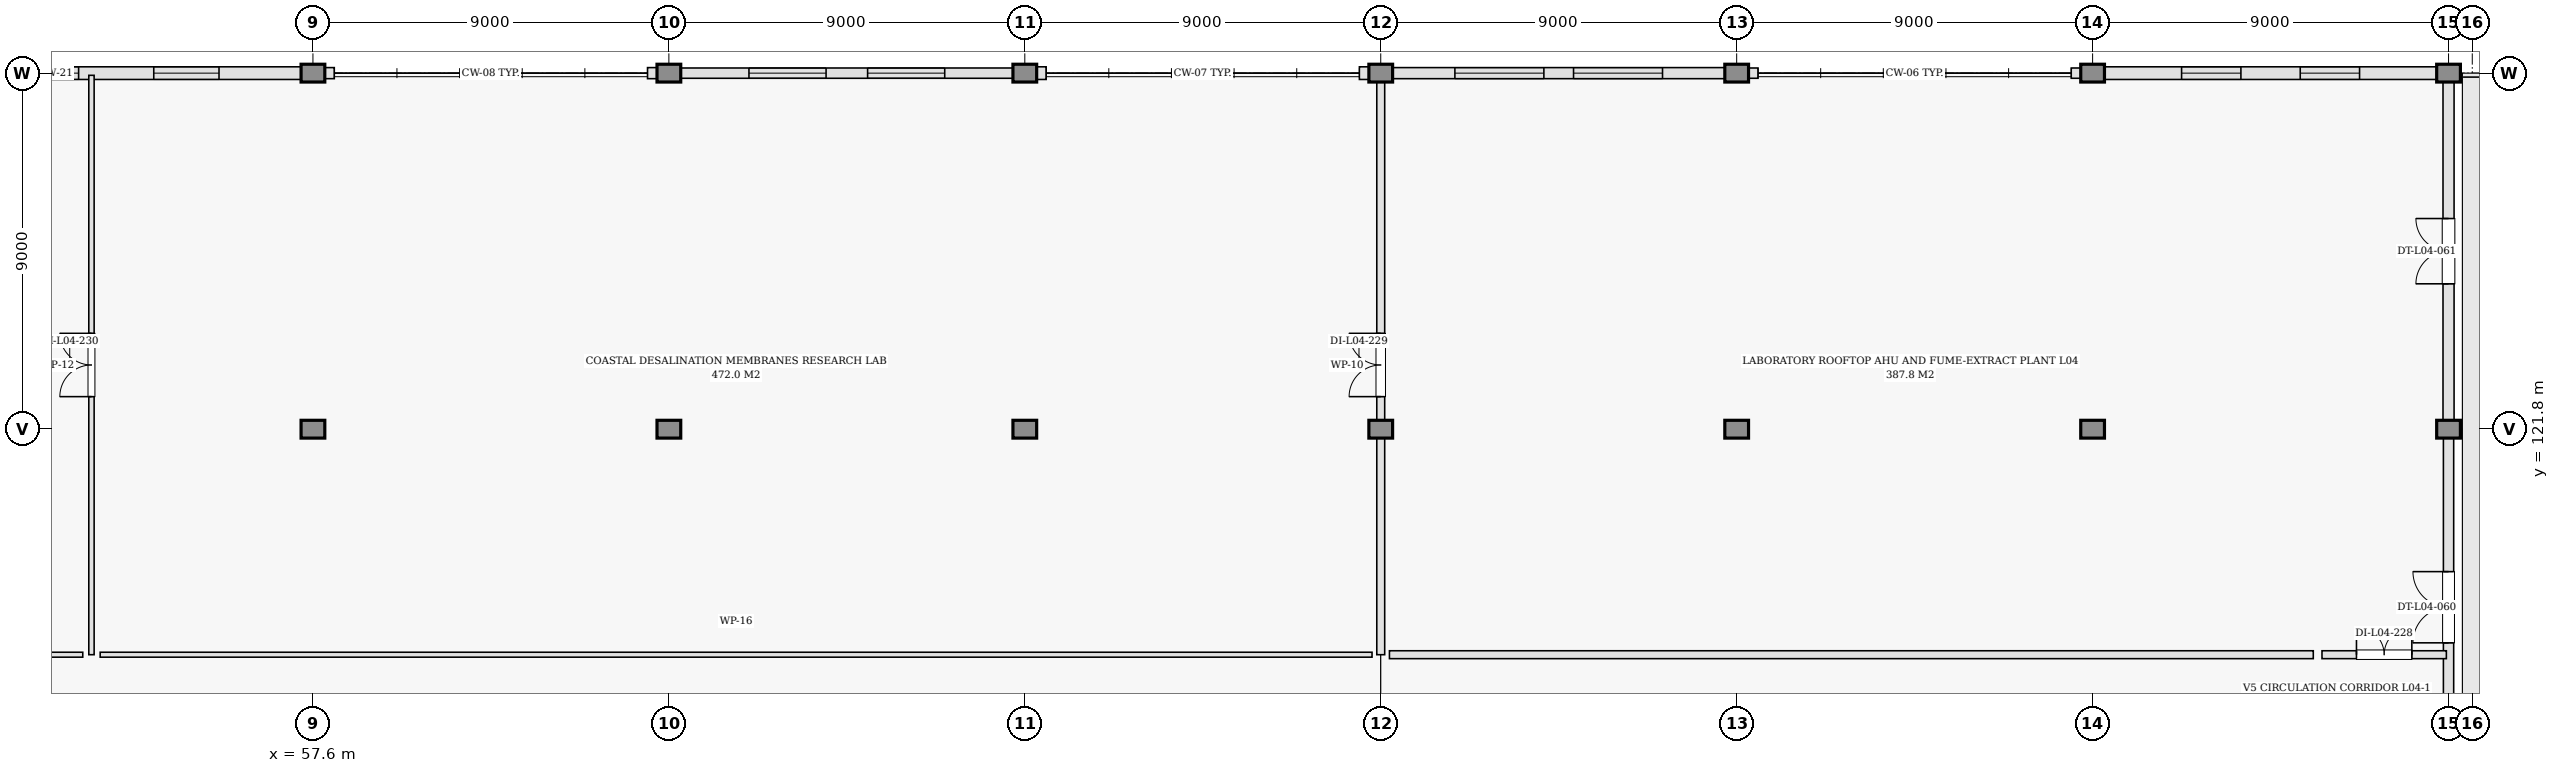
"""IFC4 building model, lengths in metres.
Left out: names, types, materials, properties, quantities, classifications, styles, units other than length and angle.
Written with IfcOpenShell. Run it as: python <this file> out.ifc"""

import sys

from ifc_helpers import new_model, si_unit, direction, frame, frame_2d, origin, origin_2d, place, context, subcontext, project, spatial, rectangle, extrude, element, fill, save


model = new_model("IFC4")
c1 = context("Model", 3, precision=1e-05, world=origin(), true_north=direction((0.0, 1.0)))
c2 = subcontext(c1, "Body", "Model", "MODEL_VIEW")
j1 = project(units=[si_unit("LENGTHUNIT", "METRE"), si_unit("PLANEANGLEUNIT", "RADIAN")], contexts=[c1])
p1 = place(None, origin())
s1 = spatial("IfcSite", under=j1, at=p1, CompositionType="ELEMENT")
p2 = place(p1, origin())
s2 = spatial("IfcBuilding", under=s1, at=p2, CompositionType="ELEMENT")
p3 = place(p2, frame((0.0, 0.0, 18.0)))
s3 = spatial("IfcBuildingStorey", under=s2, at=p3, CompositionType="ELEMENT", Elevation=18.0)
for number, where, z_axis, x_axis in (
    (1, (57.6, 121.8, 0.0), (0.0, 0.0, 1.0), (1.0, 0.0, 0.0)),
    (2, (57.6, 130.8, 0.0), (0.0, 0.0, 1.0), (1.0, 0.0, 0.0)),
    (3, (66.6, 121.8, 0.0), (0.0, 0.0, 1.0), (1.0, 0.0, 0.0)),
    (4, (66.6, 130.8, 0.0), (0.0, 0.0, 1.0), (1.0, 0.0, 0.0)),
    (5, (75.6, 121.8, 0.0), (0.0, 0.0, 1.0), (1.0, 0.0, 0.0)),
    (6, (75.6, 130.8, 0.0), (0.0, 0.0, 1.0), (1.0, 0.0, 0.0)),
    (7, (84.6, 121.8, 0.0), (0.0, 0.0, 1.0), (1.0, 0.0, 0.0)),
    (8, (84.6, 130.8, 0.0), (0.0, 0.0, 1.0), (1.0, 0.0, 0.0)),
    (9, (93.6, 121.8, 0.0), (0.0, 0.0, 1.0), (1.0, 0.0, 0.0)),
    (10, (93.6, 130.8, 0.0), (0.0, 0.0, 1.0), (1.0, 0.0, 0.0)),
    (11, (102.6, 121.8, 0.0), (0.0, 0.0, 1.0), (1.0, 0.0, 0.0)),
    (12, (102.6, 130.8, 0.0), (0.0, 0.0, 1.0), (1.0, 0.0, 0.0)),
    (13, (111.6, 121.8, 0.0), (0.0, 0.0, 1.0), (1.0, 0.0, 0.0)),
    (14, (111.6, 130.8, 0.0), (0.0, 0.0, 1.0), (1.0, 0.0, 0.0)),
):
    element("IfcColumn", number, at=place(p3, frame(where, z_axis=z_axis, x_axis=x_axis)), inside=s3, PredefinedType="COLUMN", context=c2, shape_type="SweptSolid", body=[
        extrude(rectangle(XDim=0.45, YDim=0.45, at=origin_2d()), origin(), (0.0, 0.0, 1.0), 4.2),
    ])
p4 = place(p3, frame((111.6, 112.8, 0.0), z_axis=(0.0, 0.0, 1.0), x_axis=(0.0, 1.0, 0.0)))
e15 = element("IfcWall", 15, at=p4, inside=s3, PredefinedType="SOLIDWALL", context=c2, shape_type="SweptSolid", body=[
    extrude(rectangle(XDim=9.0, YDim=0.26, at=frame_2d((4.5, 0.0))), origin(), (0.0, 0.0, 1.0), 3.94),
])
p5 = place(p4, frame((3.6, 0.0, 0.0)))
e16 = element("IfcOpeningElement", 16, at=p5, cuts=e15, PredefinedType="OPENING", context=c2, shape_type="SweptSolid", body=[
    extrude(rectangle(XDim=1.8, YDim=2.25, at=frame_2d((0.9, 1.125))), frame((0.0, 0.14, 0.0), z_axis=(0.0, -1.0, 0.0), x_axis=(1.0, 0.0, 0.0)), (0.0, 0.0, 1.0), 0.28),
])
p6 = place(p3, frame((111.6, 121.8, 0.0), z_axis=(0.0, 0.0, 1.0), x_axis=(0.0, 1.0, 0.0)))
e17 = element("IfcWall", 17, at=p6, inside=s3, PredefinedType="SOLIDWALL", context=c2, shape_type="SweptSolid", body=[
    extrude(rectangle(XDim=9.0, YDim=0.28, at=frame_2d((4.5, 0.0))), origin(), (0.0, 0.0, 1.0), 3.94),
])
p7 = place(p6, frame((3.675, 0.0, 0.0)))
e18 = element("IfcOpeningElement", 18, at=p7, cuts=e17, PredefinedType="OPENING", context=c2, shape_type="SweptSolid", body=[
    extrude(rectangle(XDim=1.65, YDim=2.2, at=frame_2d((0.825, 1.1))), frame((0.0, 0.15, 0.0), z_axis=(0.0, -1.0, 0.0), x_axis=(1.0, 0.0, 0.0)), (0.0, 0.0, 1.0), 0.3),
])
p8 = place(p3, frame((111.6, 130.8, 0.0), z_axis=(0.0, 0.0, 1.0), x_axis=(-1.0, 0.0, 0.0)))
e19 = element("IfcWall", 19, at=p8, inside=s3, PredefinedType="SOLIDWALL", context=c2, shape_type="SweptSolid", body=[
    extrude(rectangle(XDim=9.0, YDim=0.32, at=frame_2d((4.5, 0.0))), origin(), (0.0, 0.0, 1.0), 3.94),
])
p9 = place(p8, frame((2.25, 0.0, 0.95)))
e20 = element("IfcOpeningElement", 20, at=p9, cuts=e19, PredefinedType="OPENING", context=c2, shape_type="SweptSolid", body=[
    extrude(rectangle(XDim=1.5, YDim=1.65, at=frame_2d((0.75, 0.825))), frame((0.0, 0.17, 0.0), z_axis=(0.0, -1.0, 0.0), x_axis=(1.0, 0.0, 0.0)), (0.0, 0.0, 1.0), 0.34),
])
p10 = place(p8, frame((5.25, 0.0, 0.95)))
e21 = element("IfcOpeningElement", 21, at=p10, cuts=e19, PredefinedType="OPENING", context=c2, shape_type="SweptSolid", body=[
    extrude(rectangle(XDim=1.5, YDim=1.65, at=frame_2d((0.75, 0.825))), frame((0.0, 0.17, 0.0), z_axis=(0.0, -1.0, 0.0), x_axis=(1.0, 0.0, 0.0)), (0.0, 0.0, 1.0), 0.34),
])
p11 = place(p3, frame((102.6, 130.8, 0.0), z_axis=(0.0, 0.0, 1.0), x_axis=(-1.0, 0.0, 0.0)))
e22 = element("IfcWall", 22, at=p11, inside=s3, PredefinedType="SOLIDWALL", context=c2, shape_type="SweptSolid", body=[
    extrude(rectangle(XDim=0.54, YDim=0.26, at=frame_2d((0.27, 0.0))), origin(), (0.0, 0.0, 1.0), 3.94),
])
p12 = place(p3, frame((94.14, 130.8, 0.0), z_axis=(0.0, 0.0, 1.0), x_axis=(-1.0, 0.0, 0.0)))
e23 = element("IfcWall", 23, at=p12, inside=s3, PredefinedType="SOLIDWALL", context=c2, shape_type="SweptSolid", body=[
    extrude(rectangle(XDim=0.54, YDim=0.26, at=frame_2d((0.27, 0.0))), origin(), (0.0, 0.0, 1.0), 3.94),
])
p13 = place(p3, frame((93.6, 130.8, 0.0), z_axis=(0.0, 0.0, 1.0), x_axis=(-1.0, 0.0, 0.0)))
e24 = element("IfcWall", 24, at=p13, inside=s3, PredefinedType="SOLIDWALL", context=c2, shape_type="SweptSolid", body=[
    extrude(rectangle(XDim=9.0, YDim=0.28, at=frame_2d((4.5, 0.0))), origin(), (0.0, 0.0, 1.0), 3.94),
])
p14 = place(p13, frame((1.875, 0.0, 0.95)))
e25 = element("IfcOpeningElement", 25, at=p14, cuts=e24, PredefinedType="OPENING", context=c2, shape_type="SweptSolid", body=[
    extrude(rectangle(XDim=2.25, YDim=1.8, at=frame_2d((1.125, 0.9))), frame((0.0, 0.15, 0.0), z_axis=(0.0, -1.0, 0.0), x_axis=(1.0, 0.0, 0.0)), (0.0, 0.0, 1.0), 0.3),
])
p15 = place(p13, frame((4.875, 0.0, 0.95)))
e26 = element("IfcOpeningElement", 26, at=p15, cuts=e24, PredefinedType="OPENING", context=c2, shape_type="SweptSolid", body=[
    extrude(rectangle(XDim=2.25, YDim=1.8, at=frame_2d((1.125, 0.9))), frame((0.0, 0.15, 0.0), z_axis=(0.0, -1.0, 0.0), x_axis=(1.0, 0.0, 0.0)), (0.0, 0.0, 1.0), 0.3),
])
p16 = place(p3, frame((84.6, 130.8, 0.0), z_axis=(0.0, 0.0, 1.0), x_axis=(-1.0, 0.0, 0.0)))
e27 = element("IfcWall", 27, at=p16, inside=s3, PredefinedType="SOLIDWALL", context=c2, shape_type="SweptSolid", body=[
    extrude(rectangle(XDim=0.54, YDim=0.32, at=frame_2d((0.27, 0.0))), origin(), (0.0, 0.0, 1.0), 3.94),
])
p17 = place(p3, frame((76.14, 130.8, 0.0), z_axis=(0.0, 0.0, 1.0), x_axis=(-1.0, 0.0, 0.0)))
e28 = element("IfcWall", 28, at=p17, inside=s3, PredefinedType="SOLIDWALL", context=c2, shape_type="SweptSolid", body=[
    extrude(rectangle(XDim=0.54, YDim=0.32, at=frame_2d((0.27, 0.0))), origin(), (0.0, 0.0, 1.0), 3.94),
])
p18 = place(p3, frame((75.6, 130.8, 0.0), z_axis=(0.0, 0.0, 1.0), x_axis=(-1.0, 0.0, 0.0)))
e29 = element("IfcWall", 29, at=p18, inside=s3, PredefinedType="SOLIDWALL", context=c2, shape_type="SweptSolid", body=[
    extrude(rectangle(XDim=9.0, YDim=0.26, at=frame_2d((4.5, 0.0))), origin(), (0.0, 0.0, 1.0), 3.94),
])
p19 = place(p18, frame((2.025, 0.0, 0.95)))
e30 = element("IfcOpeningElement", 30, at=p19, cuts=e29, PredefinedType="OPENING", context=c2, shape_type="SweptSolid", body=[
    extrude(rectangle(XDim=1.95, YDim=1.75, at=frame_2d((0.975, 0.875))), frame((0.0, 0.14, 0.0), z_axis=(0.0, -1.0, 0.0), x_axis=(1.0, 0.0, 0.0)), (0.0, 0.0, 1.0), 0.28),
])
p20 = place(p18, frame((5.025, 0.0, 0.95)))
e31 = element("IfcOpeningElement", 31, at=p20, cuts=e29, PredefinedType="OPENING", context=c2, shape_type="SweptSolid", body=[
    extrude(rectangle(XDim=1.95, YDim=1.75, at=frame_2d((0.975, 0.875))), frame((0.0, 0.14, 0.0), z_axis=(0.0, -1.0, 0.0), x_axis=(1.0, 0.0, 0.0)), (0.0, 0.0, 1.0), 0.28),
])
p21 = place(p3, frame((66.6, 130.8, 0.0), z_axis=(0.0, 0.0, 1.0), x_axis=(-1.0, 0.0, 0.0)))
e32 = element("IfcWall", 32, at=p21, inside=s3, PredefinedType="SOLIDWALL", context=c2, shape_type="SweptSolid", body=[
    extrude(rectangle(XDim=0.54, YDim=0.28, at=frame_2d((0.27, 0.0))), origin(), (0.0, 0.0, 1.0), 3.94),
])
p22 = place(p3, frame((58.14, 130.8, 0.0), z_axis=(0.0, 0.0, 1.0), x_axis=(-1.0, 0.0, 0.0)))
e33 = element("IfcWall", 33, at=p22, inside=s3, PredefinedType="SOLIDWALL", context=c2, shape_type="SweptSolid", body=[
    extrude(rectangle(XDim=0.54, YDim=0.28, at=frame_2d((0.27, 0.0))), origin(), (0.0, 0.0, 1.0), 3.94),
])
p23 = place(p3, frame((57.6, 130.8, 0.0), z_axis=(0.0, 0.0, 1.0), x_axis=(-1.0, 0.0, 0.0)))
e34 = element("IfcWall", 34, at=p23, inside=s3, PredefinedType="SOLIDWALL", context=c2, shape_type="SweptSolid", body=[
    extrude(rectangle(XDim=9.6, YDim=0.32, at=frame_2d((4.8, 0.0))), origin(), (0.0, 0.0, 1.0), 3.94),
])
p24 = place(p23, frame((2.375, 0.0, 0.95)))
e35 = element("IfcOpeningElement", 35, at=p24, cuts=e34, PredefinedType="OPENING", context=c2, shape_type="SweptSolid", body=[
    extrude(rectangle(XDim=1.65, YDim=1.7, at=frame_2d((0.825, 0.85))), frame((0.0, 0.17, 0.0), z_axis=(0.0, -1.0, 0.0), x_axis=(1.0, 0.0, 0.0)), (0.0, 0.0, 1.0), 0.34),
])
p25 = place(p23, frame((5.925, 0.0, 0.95)))
e36 = element("IfcOpeningElement", 36, at=p25, cuts=e34, PredefinedType="OPENING", context=c2, shape_type="SweptSolid", body=[
    extrude(rectangle(XDim=0.95, YDim=1.35, at=frame_2d((0.475, 0.675))), frame((0.0, 0.17, 0.0), z_axis=(0.0, -1.0, 0.0), x_axis=(1.0, 0.0, 0.0)), (0.0, 0.0, 1.0), 0.34),
])
p26 = place(p3, frame((108.4, 116.1, 0.0), z_axis=(0.0, 0.0, 1.0), x_axis=(1.0, 0.0, 0.0)))
e37 = element("IfcWall", 37, at=p26, inside=s3, PredefinedType="PARTITIONING", context=c2, shape_type="SweptSolid", body=[
    extrude(rectangle(XDim=3.145, YDim=0.2, at=frame_2d((1.573, 0.0))), origin(), (0.0, 0.0, 1.0), 3.94),
])
p27 = place(p26, frame((0.872, 0.0, 0.0)))
e38 = element("IfcOpeningElement", 38, at=p27, cuts=e37, PredefinedType="OPENING", context=c2, shape_type="SweptSolid", body=[
    extrude(rectangle(XDim=1.4, YDim=2.15, at=frame_2d((0.7, 1.075))), frame((0.0, 0.11, 0.0), z_axis=(0.0, -1.0, 0.0), x_axis=(1.0, 0.0, 0.0)), (0.0, 0.0, 1.0), 0.22),
])
p28 = place(p3, frame((84.6, 116.1, 0.0), z_axis=(0.0, 0.0, 1.0), x_axis=(0.0, 1.0, 0.0)))
e39 = element("IfcWall", 39, at=p28, inside=s3, PredefinedType="PARTITIONING", context=c2, shape_type="SweptSolid", body=[
    extrude(rectangle(XDim=14.645, YDim=0.2, at=frame_2d((7.323, 0.0))), origin(), (0.0, 0.0, 1.0), 3.94),
])
p29 = place(p28, frame((6.523, 0.0, 0.0)))
e40 = element("IfcOpeningElement", 40, at=p29, cuts=e39, PredefinedType="OPENING", context=c2, shape_type="SweptSolid", body=[
    extrude(rectangle(XDim=1.6, YDim=2.2, at=frame_2d((0.8, 1.1))), frame((0.0, 0.11, 0.0), z_axis=(0.0, -1.0, 0.0), x_axis=(1.0, 0.0, 0.0)), (0.0, 0.0, 1.0), 0.22),
])
p30 = place(p3, frame((84.82, 116.1, 0.0), z_axis=(0.0, 0.0, 1.0), x_axis=(1.0, 0.0, 0.0)))
e41 = element("IfcWall", 41, at=p30, inside=s3, PredefinedType="PARTITIONING", context=c2, shape_type="SweptSolid", body=[
    extrude(rectangle(XDim=23.36, YDim=0.2, at=frame_2d((11.68, 0.0))), origin(), (0.0, 0.0, 1.0), 3.94),
])
p31 = place(p3, frame((52.0, 116.1, 0.0), z_axis=(0.0, 0.0, 1.0), x_axis=(0.0, 1.0, 0.0)))
e42 = element("IfcWall", 42, at=p31, inside=s3, PredefinedType="PARTITIONING", context=c2, shape_type="SweptSolid", body=[
    extrude(rectangle(XDim=14.645, YDim=0.135, at=frame_2d((7.323, 0.0))), origin(), (0.0, 0.0, 1.0), 3.94),
])
p32 = place(p31, frame((6.523, 0.0, 0.0)))
e43 = element("IfcOpeningElement", 43, at=p32, cuts=e42, PredefinedType="OPENING", context=c2, shape_type="SweptSolid", body=[
    extrude(rectangle(XDim=1.6, YDim=2.2, at=frame_2d((0.8, 1.1))), frame((0.0, 0.078, 0.0), z_axis=(0.0, -1.0, 0.0), x_axis=(1.0, 0.0, 0.0)), (0.0, 0.0, 1.0), 0.155),
])
p33 = place(p3, frame((52.22, 116.1, 0.0), z_axis=(0.0, 0.0, 1.0), x_axis=(1.0, 0.0, 0.0)))
e44 = element("IfcWall", 44, at=p33, inside=s3, PredefinedType="PARTITIONING", context=c2, shape_type="SweptSolid", body=[
    extrude(rectangle(XDim=32.16, YDim=0.125, at=frame_2d((16.08, 0.0))), origin(), (0.0, 0.0, 1.0), 3.94),
])
p34 = place(p3, frame((16.055, 116.1, 0.0), z_axis=(0.0, 0.0, 1.0), x_axis=(1.0, 0.0, 0.0)))
e45 = element("IfcWall", 45, at=p34, inside=s3, PredefinedType="PARTITIONING", context=c2, shape_type="SweptSolid", body=[
    extrude(rectangle(XDim=35.725, YDim=0.125, at=frame_2d((17.863, 0.0))), origin(), (0.0, 0.0, 1.0), 3.94),
])
p35 = place(p5, origin())
e46 = element("IfcDoor", 46, at=p35, inside=s3, OperationType="DOUBLE_DOOR_SINGLE_SWING", PredefinedType="DOOR", context=c2, shape_type="SweptSolid", body=[
    extrude(rectangle(XDim=1.8, YDim=2.25, at=frame_2d((0.9, 1.125))), frame((0.0, 0.025, 0.0), z_axis=(0.0, -1.0, 0.0), x_axis=(1.0, 0.0, 0.0)), (0.0, 0.0, 1.0), 0.05),
])
fill(e16, e46)
p36 = place(p7, origin())
e47 = element("IfcDoor", 47, at=p36, inside=s3, OperationType="DOUBLE_DOOR_SINGLE_SWING", PredefinedType="DOOR", context=c2, shape_type="SweptSolid", body=[
    extrude(rectangle(XDim=1.65, YDim=2.2, at=frame_2d((0.825, 1.1))), frame((0.0, 0.025, 0.0), z_axis=(0.0, -1.0, 0.0), x_axis=(1.0, 0.0, 0.0)), (0.0, 0.0, 1.0), 0.05),
])
fill(e18, e47)
p37 = place(p9, origin())
e48 = element("IfcWindow", 48, at=p37, inside=s3, PartitioningType="DOUBLE_PANEL_VERTICAL", PredefinedType="WINDOW", context=c2, shape_type="SweptSolid", body=[
    extrude(rectangle(XDim=1.5, YDim=1.65, at=frame_2d((0.75, 0.825))), frame((0.0, 0.03, 0.0), z_axis=(0.0, -1.0, 0.0), x_axis=(1.0, 0.0, 0.0)), (0.0, 0.0, 1.0), 0.06),
])
fill(e20, e48)
p38 = place(p10, origin())
e49 = element("IfcWindow", 49, at=p38, inside=s3, PartitioningType="DOUBLE_PANEL_VERTICAL", PredefinedType="WINDOW", context=c2, shape_type="SweptSolid", body=[
    extrude(rectangle(XDim=1.5, YDim=1.65, at=frame_2d((0.75, 0.825))), frame((0.0, 0.03, 0.0), z_axis=(0.0, -1.0, 0.0), x_axis=(1.0, 0.0, 0.0)), (0.0, 0.0, 1.0), 0.06),
])
fill(e21, e49)
p39 = place(p14, origin())
e50 = element("IfcWindow", 50, at=p39, inside=s3, PartitioningType="DOUBLE_PANEL_VERTICAL", PredefinedType="WINDOW", context=c2, shape_type="SweptSolid", body=[
    extrude(rectangle(XDim=2.25, YDim=1.8, at=frame_2d((1.125, 0.9))), frame((0.0, 0.03, 0.0), z_axis=(0.0, -1.0, 0.0), x_axis=(1.0, 0.0, 0.0)), (0.0, 0.0, 1.0), 0.06),
])
fill(e25, e50)
p40 = place(p15, origin())
e51 = element("IfcWindow", 51, at=p40, inside=s3, PartitioningType="DOUBLE_PANEL_VERTICAL", PredefinedType="WINDOW", context=c2, shape_type="SweptSolid", body=[
    extrude(rectangle(XDim=2.25, YDim=1.8, at=frame_2d((1.125, 0.9))), frame((0.0, 0.03, 0.0), z_axis=(0.0, -1.0, 0.0), x_axis=(1.0, 0.0, 0.0)), (0.0, 0.0, 1.0), 0.06),
])
fill(e26, e51)
p41 = place(p19, origin())
e52 = element("IfcWindow", 52, at=p41, inside=s3, PartitioningType="DOUBLE_PANEL_VERTICAL", PredefinedType="WINDOW", context=c2, shape_type="SweptSolid", body=[
    extrude(rectangle(XDim=1.95, YDim=1.75, at=frame_2d((0.975, 0.875))), frame((0.0, 0.03, 0.0), z_axis=(0.0, -1.0, 0.0), x_axis=(1.0, 0.0, 0.0)), (0.0, 0.0, 1.0), 0.06),
])
fill(e30, e52)
p42 = place(p20, origin())
e53 = element("IfcWindow", 53, at=p42, inside=s3, PartitioningType="DOUBLE_PANEL_VERTICAL", PredefinedType="WINDOW", context=c2, shape_type="SweptSolid", body=[
    extrude(rectangle(XDim=1.95, YDim=1.75, at=frame_2d((0.975, 0.875))), frame((0.0, 0.03, 0.0), z_axis=(0.0, -1.0, 0.0), x_axis=(1.0, 0.0, 0.0)), (0.0, 0.0, 1.0), 0.06),
])
fill(e31, e53)
p43 = place(p24, origin())
e54 = element("IfcWindow", 54, at=p43, inside=s3, PartitioningType="DOUBLE_PANEL_VERTICAL", PredefinedType="WINDOW", context=c2, shape_type="SweptSolid", body=[
    extrude(rectangle(XDim=1.65, YDim=1.7, at=frame_2d((0.825, 0.85))), frame((0.0, 0.03, 0.0), z_axis=(0.0, -1.0, 0.0), x_axis=(1.0, 0.0, 0.0)), (0.0, 0.0, 1.0), 0.06),
])
fill(e35, e54)
p44 = place(p25, origin())
e55 = element("IfcWindow", 55, at=p44, inside=s3, PartitioningType="DOUBLE_PANEL_VERTICAL", PredefinedType="WINDOW", context=c2, shape_type="SweptSolid", body=[
    extrude(rectangle(XDim=0.95, YDim=1.35, at=frame_2d((0.475, 0.675))), frame((0.0, 0.03, 0.0), z_axis=(0.0, -1.0, 0.0), x_axis=(1.0, 0.0, 0.0)), (0.0, 0.0, 1.0), 0.06),
])
fill(e36, e55)
p45 = place(p27, origin())
e56 = element("IfcDoor", 56, at=p45, inside=s3, OperationType="DOUBLE_DOOR_SINGLE_SWING", PredefinedType="DOOR", context=c2, shape_type="SweptSolid", body=[
    extrude(rectangle(XDim=1.4, YDim=2.15, at=frame_2d((0.7, 1.075))), frame((0.0, 0.025, 0.0), z_axis=(0.0, -1.0, 0.0), x_axis=(1.0, 0.0, 0.0)), (0.0, 0.0, 1.0), 0.05),
])
fill(e38, e56)
p46 = place(p29, origin())
e57 = element("IfcDoor", 57, at=p46, inside=s3, OperationType="DOUBLE_DOOR_SINGLE_SWING", PredefinedType="DOOR", context=c2, shape_type="SweptSolid", body=[
    extrude(rectangle(XDim=1.6, YDim=2.2, at=frame_2d((0.8, 1.1))), frame((0.0, 0.025, 0.0), z_axis=(0.0, -1.0, 0.0), x_axis=(1.0, 0.0, 0.0)), (0.0, 0.0, 1.0), 0.05),
])
fill(e40, e57)
p47 = place(p32, origin())
e58 = element("IfcDoor", 58, at=p47, inside=s3, OperationType="DOUBLE_DOOR_SINGLE_SWING", PredefinedType="DOOR", context=c2, shape_type="SweptSolid", body=[
    extrude(rectangle(XDim=1.6, YDim=2.2, at=frame_2d((0.8, 1.1))), frame((0.0, 0.025, 0.0), z_axis=(0.0, -1.0, 0.0), x_axis=(1.0, 0.0, 0.0)), (0.0, 0.0, 1.0), 0.05),
])
fill(e43, e58)
save(model, sys.argv[1])
